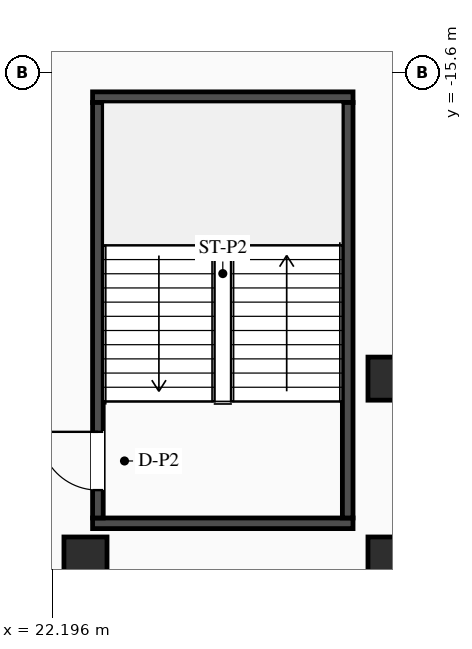
"""IFC4 building model, lengths in metres.
Left out: names, types, materials, properties, quantities, classifications, styles, units other than length and angle.
Written with IfcOpenShell. Run it as: python <this file> out.ifc"""

import sys

from ifc_helpers import new_model, si_unit, direction, frame, frame_2d, origin, origin_2d, place, context, subcontext, project, spatial, rectangle, i_section, extrude, element, fill, save


model = new_model("IFC4")
c1 = context("Model", 3, precision=1e-05, world=origin(), true_north=direction((0.0, 1.0)))
c2 = subcontext(c1, "Body", "Model", "MODEL_VIEW")
j1 = project(units=[si_unit("LENGTHUNIT", "METRE"), si_unit("PLANEANGLEUNIT", "RADIAN")], contexts=[c1])
p1 = place(None, origin())
s1 = spatial("IfcSite", under=j1, at=p1, CompositionType="ELEMENT")
p2 = place(p1, origin())
s2 = spatial("IfcBuilding", under=s1, at=p2, CompositionType="ELEMENT")
p3 = place(p2, frame((0.0, 0.0, 9.6)))
s3 = spatial("IfcBuildingStorey", under=s2, at=p3, CompositionType="ELEMENT", Elevation=9.6)
for number, where, z_axis, x_axis in (
    (1, (22.99, -24.505, 0.0), (0.0, 0.0, 1.0), (1.0, 0.0, 0.0)),
    (2, (22.99, -16.095, 0.0), (0.0, 0.0, 1.0), (1.0, 0.0, 0.0)),
):
    element("IfcWall", number, at=place(p3, frame(where, z_axis=z_axis, x_axis=x_axis)), inside=s3, PredefinedType="SHEAR", context=c2, shape_type="SweptSolid", body=[
        extrude(rectangle(XDim=5.14, YDim=0.21, at=frame_2d((2.57, 0.0))), origin(), (0.0, 0.0, 1.0), 4.25),
    ])
p4 = place(p3, frame((23.095, -24.4, 0.0), z_axis=(0.0, 0.0, 1.0), x_axis=(0.0, 1.0, 0.0)))
e3 = element("IfcWall", 3, at=p4, inside=s3, PredefinedType="SHEAR", context=c2, shape_type="SweptSolid", body=[
    extrude(rectangle(XDim=8.2, YDim=0.21, at=frame_2d((4.1, 0.0))), origin(), (0.0, 0.0, 1.0), 4.25),
])
p5 = place(p4, frame((0.55, 0.0, 0.0)))
e4 = element("IfcOpeningElement", 4, at=p5, cuts=e3, PredefinedType="OPENING", context=c2, shape_type="SweptSolid", body=[
    extrude(rectangle(XDim=1.15, YDim=2.1, at=frame_2d((0.575, 1.05))), frame((0.0, 0.115, 0.0), z_axis=(0.0, -1.0, 0.0), x_axis=(1.0, 0.0, 0.0)), (0.0, 0.0, 1.0), 0.23),
])
p6 = place(p3, frame((28.025, -24.4, 0.0), z_axis=(0.0, 0.0, 1.0), x_axis=(0.0, 1.0, 0.0)))
e5 = element("IfcWall", 5, at=p6, inside=s3, PredefinedType="SHEAR", context=c2, shape_type="SweptSolid", body=[
    extrude(rectangle(XDim=8.2, YDim=0.21, at=frame_2d((4.1, 0.0))), origin(), (0.0, 0.0, 1.0), 4.25),
])
for number, where, z_axis, x_axis in (
    (6, (28.85, -21.65, 0.0), (0.0, 0.0, 1.0), (1.0, 0.0, 0.0)),
    (7, (22.85, -25.2, 0.0), (0.0, 0.0, 1.0), (1.0, 0.0, 0.0)),
    (8, (28.85, -25.2, 0.0), (0.0, 0.0, 1.0), (1.0, 0.0, 0.0)),
):
    element("IfcColumn", number, at=place(p3, frame(where, z_axis=z_axis, x_axis=x_axis)), inside=s3, PredefinedType="COLUMN", context=c2, shape_type="SweptSolid", body=[
        extrude(i_section(OverallWidth=0.85, OverallDepth=0.85, WebThickness=0.032, FlangeThickness=0.048, at=origin_2d()), origin(), (0.0, 0.0, 1.0), 4.5),
    ])
p7 = place(p5, origin())
e9 = element("IfcDoor", 9, at=p7, inside=s3, OperationType="SINGLE_SWING_RIGHT", PredefinedType="DOOR", context=c2, shape_type="SweptSolid", body=[
    extrude(rectangle(XDim=1.15, YDim=2.1, at=frame_2d((0.575, 1.05))), frame((0.0, 0.025, 0.0), z_axis=(0.0, -1.0, 0.0), x_axis=(1.0, 0.0, 0.0)), (0.0, 0.0, 1.0), 0.05),
])
fill(e4, e9)
save(model, sys.argv[1])
